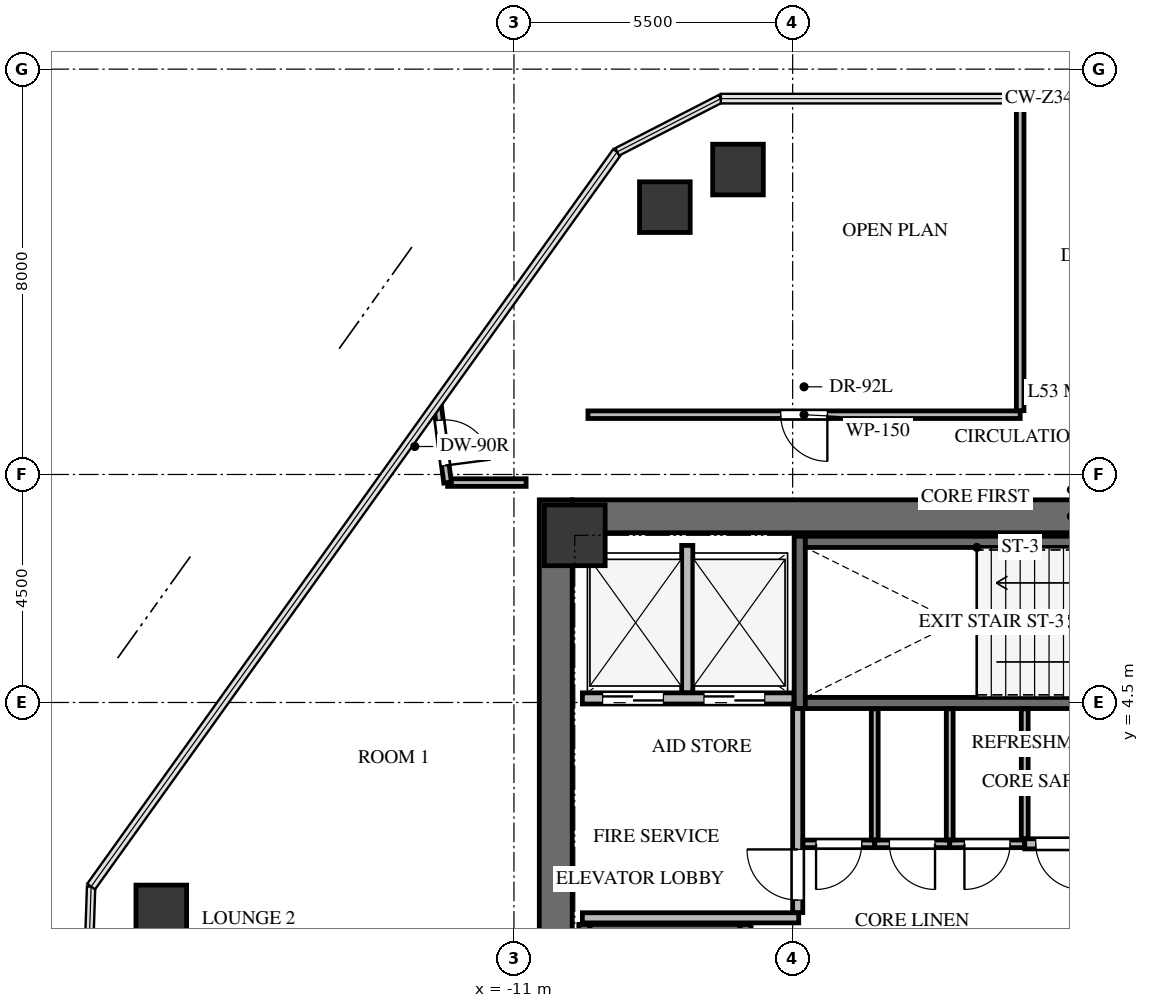
"""IFC4 building model, lengths in metres.
Left out: names, types, materials, properties, quantities, classifications, styles, units other than length and angle.
Written with IfcOpenShell. Run it as: python <this file> out.ifc"""

import sys

from ifc_helpers import new_model, si_unit, direction, frame, frame_2d, origin, origin_2d, place, context, subcontext, project, spatial, rectangle, extrude, source, transform, mapped, element, fill, save


model = new_model("IFC4")
c1 = context("Model", 3, precision=1e-05, world=origin(), true_north=direction((0.0, 1.0)))
c2 = subcontext(c1, "Body", "Model", "MODEL_VIEW")
j1 = project(units=[si_unit("LENGTHUNIT", "METRE"), si_unit("PLANEANGLEUNIT", "RADIAN")], contexts=[c1])
p1 = place(None, origin())
s1 = spatial("IfcSite", under=j1, at=p1, CompositionType="ELEMENT")
p2 = place(p1, origin())
s2 = spatial("IfcBuilding", under=s1, at=p2, CompositionType="ELEMENT")
p3 = place(p2, frame((0.0, 0.0, 193.6)))
s3 = spatial("IfcBuildingStorey", under=s2, at=p3, CompositionType="ELEMENT", Elevation=193.6)
p4 = place(p3, frame((-10.175, -8.5, 0.0), z_axis=(0.0, 0.0, 1.0), x_axis=(0.0, 1.0, 0.0)))
e1 = element("IfcWall", 1, at=p4, inside=s3, PredefinedType="SHEAR", context=c2, shape_type="SweptSolid", body=[
    extrude(rectangle(XDim=17.0, YDim=0.65, at=frame_2d((8.5, 0.0))), origin(), (0.0, 0.0, 1.0), 3.3),
])
p5 = place(p3, frame((-9.85, 8.175, 0.0), z_axis=(0.0, 0.0, 1.0), x_axis=(1.0, 0.0, 0.0)))
e2 = element("IfcWall", 2, at=p5, inside=s3, PredefinedType="SHEAR", context=c2, shape_type="SweptSolid", body=[
    extrude(rectangle(XDim=19.7, YDim=0.65, at=frame_2d((9.85, 0.0))), origin(), (0.0, 0.0, 1.0), 3.3),
])
p6 = place(p3, frame((-6.43, -7.77, -0.24), z_axis=(0.0, 0.0, 1.0), x_axis=(0.0, 1.0, 0.0)))
e3 = element("IfcWall", 3, at=p6, inside=s3, PredefinedType="SHEAR", context=c2, shape_type="SweptSolid", body=[
    extrude(rectangle(XDim=7.89, YDim=0.22, at=frame_2d((3.945, 0.0))), origin(), (0.0, 0.0, 1.0), 3.3),
])
p7 = place(p6, frame((6.32, 0.0, 0.0)))
e4 = element("IfcOpeningElement", 4, at=p7, cuts=e3, PredefinedType="OPENING", context=c2, shape_type="SweptSolid", body=[
    extrude(rectangle(XDim=1.05, YDim=2.15, at=frame_2d((0.525, 1.075))), frame((0.0, 0.12, 0.0), z_axis=(0.0, -1.0, 0.0), x_axis=(1.0, 0.0, 0.0)), (0.0, 0.0, 1.0), 0.24),
])
p8 = place(p3, frame((-9.61, 0.12, -0.24), z_axis=(0.0, 0.0, 1.0), x_axis=(0.0, -1.0, 0.0)))
e5 = element("IfcWall", 5, at=p8, inside=s3, PredefinedType="SHEAR", context=c2, shape_type="SweptSolid", body=[
    extrude(rectangle(XDim=7.89, YDim=0.22, at=frame_2d((3.945, 0.0))), origin(), (0.0, 0.0, 1.0), 3.3),
])
p9 = place(p3, frame((-6.54, 0.01, -0.24), z_axis=(0.0, 0.0, 1.0), x_axis=(-1.0, 0.0, 0.0)))
e6 = element("IfcWall", 6, at=p9, inside=s3, PredefinedType="SHEAR", context=c2, shape_type="SweptSolid", body=[
    extrude(rectangle(XDim=2.96, YDim=0.22, at=frame_2d((1.48, 0.0))), origin(), (0.0, 0.0, 1.0), 3.3),
])
p10 = place(p3, frame((-5.36, 7.78, -0.24), z_axis=(0.0, 0.0, 1.0), x_axis=(0.0, -1.0, 0.0)))
e7 = element("IfcWall", 7, at=p10, inside=s3, PredefinedType="SHEAR", context=c2, shape_type="SweptSolid", body=[
    extrude(rectangle(XDim=3.4, YDim=0.22, at=frame_2d((1.7, 0.0))), origin(), (0.0, 0.0, 1.0), 3.3),
])
p11 = place(p3, frame((-5.25, 4.49, -0.24), z_axis=(0.0, 0.0, 1.0), x_axis=(1.0, 0.0, 0.0)))
e8 = element("IfcWall", 8, at=p11, inside=s3, PredefinedType="SHEAR", context=c2, shape_type="SweptSolid", body=[
    extrude(rectangle(XDim=7.35, YDim=0.22, at=frame_2d((3.675, 0.0))), origin(), (0.0, 0.0, 1.0), 3.3),
])
p12 = place(p11, frame((5.85, 0.0, 0.0)))
e9 = element("IfcOpeningElement", 9, at=p12, cuts=e8, PredefinedType="OPENING", context=c2, shape_type="SweptSolid", body=[
    extrude(rectangle(XDim=1.05, YDim=2.15, at=frame_2d((0.525, 1.075))), frame((0.0, 0.12, 0.0), z_axis=(0.0, -1.0, 0.0), x_axis=(1.0, 0.0, 0.0)), (0.0, 0.0, 1.0), 0.24),
])
p13 = place(p3, frame((2.1, 7.67, -0.24), z_axis=(0.0, 0.0, 1.0), x_axis=(-1.0, 0.0, 0.0)))
e10 = element("IfcWall", 10, at=p13, inside=s3, PredefinedType="SHEAR", context=c2, shape_type="SweptSolid", body=[
    extrude(rectangle(XDim=7.35, YDim=0.22, at=frame_2d((3.675, 0.0))), origin(), (0.0, 0.0, 1.0), 3.3),
])
m1 = source(origin(), c2, "Body", "SweptSolid", [
    extrude(rectangle(XDim=1.2, YDim=1.2, at=origin_2d()), origin(), (0.0, 0.0, 1.0), 3.3),
])
p14 = place(p3, frame((-9.8, 7.8, -0.24), z_axis=(0.0, 0.0, 1.0), x_axis=(1.0, 0.0, 0.0)))
e11 = element("IfcColumn", 11, at=p14, inside=s3, PredefinedType="COLUMN", context=c2, shape_type="MappedRepresentation", body=[
    mapped(m1, transform((0.0, 0.0, 0.0), x_axis=(1.0, 0.0, 0.0), y_axis=(0.0, 1.0, 0.0), z_axis=(0.0, 0.0, 1.0), scale=1.0)),
])
m2 = source(origin(), c2, "Body", "SweptSolid", [
    extrude(rectangle(XDim=1.0, YDim=1.0, at=origin_2d()), origin(), (0.0, 0.0, 1.0), 3.3),
])
for number, where, z_axis, x_axis in (
    (12, (-17.96, 0.396, -0.24), (0.0, 0.0, 1.0), (1.0, 0.0, 0.0)),
    (13, (-8.022, 14.276, -0.24), (0.0, 0.0, 1.0), (1.0, 0.0, 0.0)),
    (14, (-6.579, 15.018, -0.24), (0.0, 0.0, 1.0), (1.0, 0.0, 0.0)),
):
    element("IfcColumn", number, at=place(p3, frame(where, z_axis=z_axis, x_axis=x_axis)), inside=s3, PredefinedType="COLUMN", context=c2, shape_type="MappedRepresentation", body=[
        mapped(m2, transform((0.0, 0.0, 0.0), x_axis=(1.0, 0.0, 0.0), y_axis=(0.0, 1.0, 0.0), z_axis=(0.0, 0.0, 1.0), scale=1.0)),
    ])
p15 = place(p3, frame((-9.65, 4.58, 0.0), z_axis=(0.0, 0.0, 1.0), x_axis=(1.0, 0.0, 0.0)))
e15 = element("IfcWall", 15, at=p15, inside=s3, PredefinedType="SOLIDWALL", context=c2, shape_type="SweptSolid", body=[
    extrude(rectangle(XDim=4.175, YDim=0.22, at=frame_2d((2.087, 0.0))), origin(), (0.0, 0.0, 1.0), 3.045),
])
p16 = place(p15, frame((0.4, 0.0, 0.0)))
e16 = element("IfcOpeningElement", 16, at=p16, cuts=e15, PredefinedType="OPENING", context=c2, shape_type="SweptSolid", body=[
    extrude(rectangle(XDim=1.2, YDim=2.15, at=frame_2d((0.6, 1.075))), frame((0.0, 0.12, 0.0), z_axis=(0.0, -1.0, 0.0), x_axis=(1.0, 0.0, 0.0)), (0.0, 0.0, 1.0), 0.24),
])
p17 = place(p15, frame((2.4, 0.0, 0.0)))
e17 = element("IfcOpeningElement", 17, at=p17, cuts=e15, PredefinedType="OPENING", context=c2, shape_type="SweptSolid", body=[
    extrude(rectangle(XDim=1.2, YDim=2.15, at=frame_2d((0.6, 1.075))), frame((0.0, 0.12, 0.0), z_axis=(0.0, -1.0, 0.0), x_axis=(1.0, 0.0, 0.0)), (0.0, 0.0, 1.0), 0.24),
])
p18 = place(p3, frame((-7.58, 4.694, 0.0), z_axis=(0.0, 0.0, 1.0), x_axis=(0.0, 1.0, 0.0)))
e18 = element("IfcWall", 18, at=p18, inside=s3, PredefinedType="SOLIDWALL", context=c2, shape_type="SweptSolid", body=[
    extrude(rectangle(XDim=2.906, YDim=0.22, at=frame_2d((1.453, 0.0))), origin(), (0.0, 0.0, 1.0), 3.045),
])
p19 = place(p3, frame((-9.65, 0.25, 0.0), z_axis=(0.0, 0.0, 1.0), x_axis=(1.0, 0.0, 0.0)))
e19 = element("IfcWall", 19, at=p19, inside=s3, PredefinedType="SOLIDWALL", context=c2, shape_type="SweptSolid", body=[
    extrude(rectangle(XDim=4.27, YDim=0.2, at=frame_2d((2.135, 0.0))), origin(), (0.0, 0.0, 1.0), 3.045),
])
p20 = place(p3, frame((-5.4, 0.354, 0.0), z_axis=(0.0, 0.0, 1.0), x_axis=(0.0, 1.0, 0.0)))
e20 = element("IfcWall", 20, at=p20, inside=s3, PredefinedType="SOLIDWALL", context=c2, shape_type="SweptSolid", body=[
    extrude(rectangle(XDim=4.026, YDim=0.2, at=frame_2d((2.013, 0.0))), origin(), (0.0, 0.0, 1.0), 3.045),
])
p21 = place(p20, frame((0.246, 0.0, 0.0)))
e21 = element("IfcOpeningElement", 21, at=p21, cuts=e20, PredefinedType="OPENING", context=c2, shape_type="SweptSolid", body=[
    extrude(rectangle(XDim=1.0, YDim=2.15, at=frame_2d((0.5, 1.075))), frame((0.0, 0.11, 0.0), z_axis=(0.0, -1.0, 0.0), x_axis=(1.0, 0.0, 0.0)), (0.0, 0.0, 1.0), 0.22),
])
p22 = place(p3, frame((-3.88, 1.71, 0.0), z_axis=(0.0, 0.0, 1.0), x_axis=(-1.0, 0.0, 0.0)))
e22 = element("IfcWall", 22, at=p22, inside=s3, PredefinedType="PARTITIONING", context=c2, shape_type="SweptSolid", body=[
    extrude(rectangle(XDim=1.416, YDim=0.15, at=frame_2d((0.708, 0.0))), origin(), (0.0, 0.0, 1.0), 3.045),
])
p23 = place(p22, frame((0.258, 0.0, 0.0)))
e23 = element("IfcOpeningElement", 23, at=p23, cuts=e22, PredefinedType="OPENING", context=c2, shape_type="SweptSolid", body=[
    extrude(rectangle(XDim=0.9, YDim=2.05, at=frame_2d((0.45, 1.025))), frame((0.0, 0.085, 0.0), z_axis=(0.0, -1.0, 0.0), x_axis=(1.0, 0.0, 0.0)), (0.0, 0.0, 1.0), 0.17),
])
p24 = place(p3, frame((-2.4, 1.71, 0.0), z_axis=(0.0, 0.0, 1.0), x_axis=(-1.0, 0.0, 0.0)))
e24 = element("IfcWall", 24, at=p24, inside=s3, PredefinedType="PARTITIONING", context=c2, shape_type="SweptSolid", body=[
    extrude(rectangle(XDim=1.48, YDim=0.15, at=frame_2d((0.74, 0.0))), origin(), (0.0, 0.0, 1.0), 3.045),
])
p25 = place(p24, frame((0.29, 0.0, 0.0)))
e25 = element("IfcOpeningElement", 25, at=p25, cuts=e24, PredefinedType="OPENING", context=c2, shape_type="SweptSolid", body=[
    extrude(rectangle(XDim=0.9, YDim=2.05, at=frame_2d((0.45, 1.025))), frame((0.0, 0.085, 0.0), z_axis=(0.0, -1.0, 0.0), x_axis=(1.0, 0.0, 0.0)), (0.0, 0.0, 1.0), 0.17),
])
p26 = place(p3, frame((-0.92, 1.71, 0.0), z_axis=(0.0, 0.0, 1.0), x_axis=(-1.0, 0.0, 0.0)))
e26 = element("IfcWall", 26, at=p26, inside=s3, PredefinedType="PARTITIONING", context=c2, shape_type="SweptSolid", body=[
    extrude(rectangle(XDim=1.48, YDim=0.15, at=frame_2d((0.74, 0.0))), origin(), (0.0, 0.0, 1.0), 3.045),
])
p27 = place(p26, frame((0.29, 0.0, 0.0)))
e27 = element("IfcOpeningElement", 27, at=p27, cuts=e26, PredefinedType="OPENING", context=c2, shape_type="SweptSolid", body=[
    extrude(rectangle(XDim=0.9, YDim=2.05, at=frame_2d((0.45, 1.025))), frame((0.0, 0.085, 0.0), z_axis=(0.0, -1.0, 0.0), x_axis=(1.0, 0.0, 0.0)), (0.0, 0.0, 1.0), 0.17),
])
p28 = place(p3, frame((0.416, 1.71, 0.0), z_axis=(0.0, 0.0, 1.0), x_axis=(-1.0, 0.0, 0.0)))
e28 = element("IfcWall", 28, at=p28, inside=s3, PredefinedType="SOLIDWALL", context=c2, shape_type="SweptSolid", body=[
    extrude(rectangle(XDim=1.336, YDim=0.2, at=frame_2d((0.668, 0.0))), origin(), (0.0, 0.0, 1.0), 3.045),
])
p29 = place(p28, frame((0.218, 0.0, 0.0)))
e29 = element("IfcOpeningElement", 29, at=p29, cuts=e28, PredefinedType="OPENING", context=c2, shape_type="SweptSolid", body=[
    extrude(rectangle(XDim=0.9, YDim=2.05, at=frame_2d((0.45, 1.025))), frame((0.0, 0.11, 0.0), z_axis=(0.0, -1.0, 0.0), x_axis=(1.0, 0.0, 0.0)), (0.0, 0.0, 1.0), 0.22),
])
p30 = place(p3, frame((-1.01, 10.18, 0.0), z_axis=(0.0, 0.0, 1.0), x_axis=(-1.0, 0.0, 0.0)))
e30 = element("IfcWall", 30, at=p30, inside=s3, PredefinedType="PARTITIONING", context=c2, shape_type="SweptSolid", body=[
    extrude(rectangle(XDim=8.53, YDim=0.15, at=frame_2d((4.265, 0.0))), origin(), (0.0, 0.0, 1.0), 2.242),
])
p31 = place(p30, frame((3.805, 0.0, 0.0)))
e31 = element("IfcOpeningElement", 31, at=p31, cuts=e30, PredefinedType="OPENING", context=c2, shape_type="SweptSolid", body=[
    extrude(rectangle(XDim=0.92, YDim=2.1, at=frame_2d((0.46, 1.05))), frame((0.0, 0.085, 0.0), z_axis=(0.0, -1.0, 0.0), x_axis=(1.0, 0.0, 0.0)), (0.0, 0.0, 1.0), 0.17),
])
p32 = place(p3, frame((-1.01, 16.418, 0.0), z_axis=(0.0, 0.0, 1.0), x_axis=(0.0, -1.0, 0.0)))
e32 = element("IfcWall", 32, at=p32, inside=s3, PredefinedType="PARTITIONING", context=c2, shape_type="SweptSolid", body=[
    extrude(rectangle(XDim=6.159, YDim=0.15, at=frame_2d((3.08, 0.0))), origin(), (0.0, 0.0, 1.0), 2.399),
])
p33 = place(p3, frame((-12.31, 8.84, 0.0), z_axis=(0.0, 0.0, 1.0), x_axis=(1.0, 0.0, 0.0)))
e33 = element("IfcWall", 33, at=p33, inside=s3, PredefinedType="PARTITIONING", context=c2, shape_type="SweptSolid", body=[
    extrude(rectangle(XDim=1.55, YDim=0.15, at=frame_2d((0.775, 0.0))), origin(), (0.0, 0.0, 1.0), 2.399),
])
p34 = place(p3, frame((-12.514, 10.406, 0.0), z_axis=(0.0, 0.0, 1.0), x_axis=(0.129378833178, -0.991595238757, 0.0)))
e34 = element("IfcWall", 34, at=p34, inside=s3, PredefinedType="PARTITIONING", context=c2, shape_type="SweptSolid", body=[
    extrude(rectangle(XDim=1.579, YDim=0.15, at=frame_2d((0.79, 0.0))), origin(), (0.0, 0.0, 1.0), 3.045),
])
p35 = place(p34, frame((0.34, 0.0, 0.0)))
e35 = element("IfcOpeningElement", 35, at=p35, cuts=e34, PredefinedType="OPENING", context=c2, shape_type="SweptSolid", body=[
    extrude(rectangle(XDim=0.9, YDim=2.05, at=frame_2d((0.45, 1.025))), frame((0.0, 0.085, 0.0), z_axis=(0.0, -1.0, 0.0), x_axis=(1.0, 0.0, 0.0)), (0.0, 0.0, 1.0), 0.17),
])
for number, where, z_axis, x_axis in (
    (36, (-3.88, 4.375, 0.0), (0.0, 0.0, 1.0), (0.0, -1.0, 0.0)),
    (37, (-2.4, 4.375, 0.0), (0.0, 0.0, 1.0), (0.0, -1.0, 0.0)),
):
    element("IfcWall", number, at=place(p3, frame(where, z_axis=z_axis, x_axis=x_axis)), inside=s3, PredefinedType="PARTITIONING", context=c2, shape_type="SweptSolid", body=[
        extrude(rectangle(XDim=2.586, YDim=0.135, at=frame_2d((1.293, 0.0))), origin(), (0.0, 0.0, 1.0), 3.045),
    ])
p36 = place(p3, frame((-0.92, 4.375, 0.0), z_axis=(0.0, 0.0, 1.0), x_axis=(0.0, -1.0, 0.0)))
e38 = element("IfcWall", 38, at=p36, inside=s3, PredefinedType="PARTITIONING", context=c2, shape_type="SweptSolid", body=[
    extrude(rectangle(XDim=2.561, YDim=0.135, at=frame_2d((1.281, 0.0))), origin(), (0.0, 0.0, 1.0), 3.045),
])
m3 = source(origin(), c2, "Body", "SweptSolid", [
    extrude(rectangle(XDim=1.2, YDim=2.15, at=frame_2d((0.6, 1.075))), frame((0.0, 0.025, 0.0), z_axis=(0.0, -1.0, 0.0), x_axis=(1.0, 0.0, 0.0)), (0.0, 0.0, 1.0), 0.05),
])
p37 = place(p16, origin())
e39 = element("IfcDoor", 39, at=p37, inside=s3, OperationType="DOUBLE_DOOR_SLIDING", PredefinedType="DOOR", context=c2, shape_type="MappedRepresentation", body=[
    mapped(m3, transform((0.0, 0.0, 0.0), x_axis=(1.0, 0.0, 0.0), y_axis=(0.0, 1.0, 0.0), z_axis=(0.0, 0.0, 1.0), scale=1.0)),
])
fill(e16, e39)
p38 = place(p17, origin())
e40 = element("IfcDoor", 40, at=p38, inside=s3, OperationType="DOUBLE_DOOR_SLIDING", PredefinedType="DOOR", context=c2, shape_type="MappedRepresentation", body=[
    mapped(m3, transform((0.0, 0.0, 0.0), x_axis=(1.0, 0.0, 0.0), y_axis=(0.0, 1.0, 0.0), z_axis=(0.0, 0.0, 1.0), scale=1.0)),
])
fill(e17, e40)
m4 = source(origin(), c2, "Body", "SweptSolid", [
    extrude(rectangle(XDim=1.0, YDim=2.15, at=frame_2d((0.5, 1.075))), frame((0.0, 0.025, 0.0), z_axis=(0.0, -1.0, 0.0), x_axis=(1.0, 0.0, 0.0)), (0.0, 0.0, 1.0), 0.05),
])
p39 = place(p21, origin())
e41 = element("IfcDoor", 41, at=p39, inside=s3, OperationType="SINGLE_SWING_RIGHT", PredefinedType="DOOR", context=c2, shape_type="MappedRepresentation", body=[
    mapped(m4, transform((0.0, 0.0, 0.0), x_axis=(1.0, 0.0, 0.0), y_axis=(0.0, 1.0, 0.0), z_axis=(0.0, 0.0, 1.0), scale=1.0)),
])
fill(e21, e41)
m5 = source(origin(), c2, "Body", "SweptSolid", [
    extrude(rectangle(XDim=0.9, YDim=2.05, at=frame_2d((0.45, 1.025))), frame((0.0, 0.025, 0.0), z_axis=(0.0, -1.0, 0.0), x_axis=(1.0, 0.0, 0.0)), (0.0, 0.0, 1.0), 0.05),
])
p40 = place(p23, origin())
e42 = element("IfcDoor", 42, at=p40, inside=s3, OperationType="SINGLE_SWING_RIGHT", PredefinedType="DOOR", context=c2, shape_type="MappedRepresentation", body=[
    mapped(m5, transform((0.0, 0.0, 0.0), x_axis=(1.0, 0.0, 0.0), y_axis=(0.0, 1.0, 0.0), z_axis=(0.0, 0.0, 1.0), scale=1.0)),
])
fill(e23, e42)
m6 = source(origin(), c2, "Body", "SweptSolid", [
    extrude(rectangle(XDim=0.9, YDim=2.05, at=frame_2d((0.45, 1.025))), frame((0.0, 0.025, 0.0), z_axis=(0.0, -1.0, 0.0), x_axis=(1.0, 0.0, 0.0)), (0.0, 0.0, 1.0), 0.05),
])
p41 = place(p25, origin())
e43 = element("IfcDoor", 43, at=p41, inside=s3, OperationType="SINGLE_SWING_LEFT", PredefinedType="DOOR", context=c2, shape_type="MappedRepresentation", body=[
    mapped(m6, transform((0.0, 0.0, 0.0), x_axis=(1.0, 0.0, 0.0), y_axis=(0.0, 1.0, 0.0), z_axis=(0.0, 0.0, 1.0), scale=1.0)),
])
fill(e25, e43)
p42 = place(p27, origin())
e44 = element("IfcDoor", 44, at=p42, inside=s3, OperationType="SINGLE_SWING_RIGHT", PredefinedType="DOOR", context=c2, shape_type="MappedRepresentation", body=[
    mapped(m5, transform((0.0, 0.0, 0.0), x_axis=(1.0, 0.0, 0.0), y_axis=(0.0, 1.0, 0.0), z_axis=(0.0, 0.0, 1.0), scale=1.0)),
])
fill(e27, e44)
p43 = place(p29, origin())
e45 = element("IfcDoor", 45, at=p43, inside=s3, OperationType="SINGLE_SWING_LEFT", PredefinedType="DOOR", context=c2, shape_type="MappedRepresentation", body=[
    mapped(m6, transform((0.0, 0.0, 0.0), x_axis=(1.0, 0.0, 0.0), y_axis=(0.0, 1.0, 0.0), z_axis=(0.0, 0.0, 1.0), scale=1.0)),
])
fill(e29, e45)
m7 = source(origin(), c2, "Body", "SweptSolid", [
    extrude(rectangle(XDim=0.92, YDim=2.1, at=frame_2d((0.46, 1.05))), frame((0.0, 0.025, 0.0), z_axis=(0.0, -1.0, 0.0), x_axis=(1.0, 0.0, 0.0)), (0.0, 0.0, 1.0), 0.05),
])
p44 = place(p31, origin())
e46 = element("IfcDoor", 46, at=p44, inside=s3, OperationType="SINGLE_SWING_LEFT", PredefinedType="DOOR", context=c2, shape_type="MappedRepresentation", body=[
    mapped(m7, transform((0.0, 0.0, 0.0), x_axis=(1.0, 0.0, 0.0), y_axis=(0.0, 1.0, 0.0), z_axis=(0.0, 0.0, 1.0), scale=1.0)),
])
fill(e31, e46)
m8 = source(origin(), c2, "Body", "SweptSolid", [
    extrude(rectangle(XDim=0.9, YDim=2.05, at=frame_2d((0.45, 1.025))), frame((0.0, 0.025, 0.0), z_axis=(0.0, -1.0, 0.0), x_axis=(1.0, 0.0, 0.0)), (0.0, 0.0, 1.0), 0.05),
])
p45 = place(p35, origin())
e47 = element("IfcDoor", 47, at=p45, inside=s3, OperationType="SINGLE_SWING_RIGHT", PredefinedType="DOOR", context=c2, shape_type="MappedRepresentation", body=[
    mapped(m8, transform((0.0, 0.0, 0.0), x_axis=(1.0, 0.0, 0.0), y_axis=(0.0, 1.0, 0.0), z_axis=(0.0, 0.0, 1.0), scale=1.0)),
])
fill(e35, e47)
save(model, sys.argv[1])
